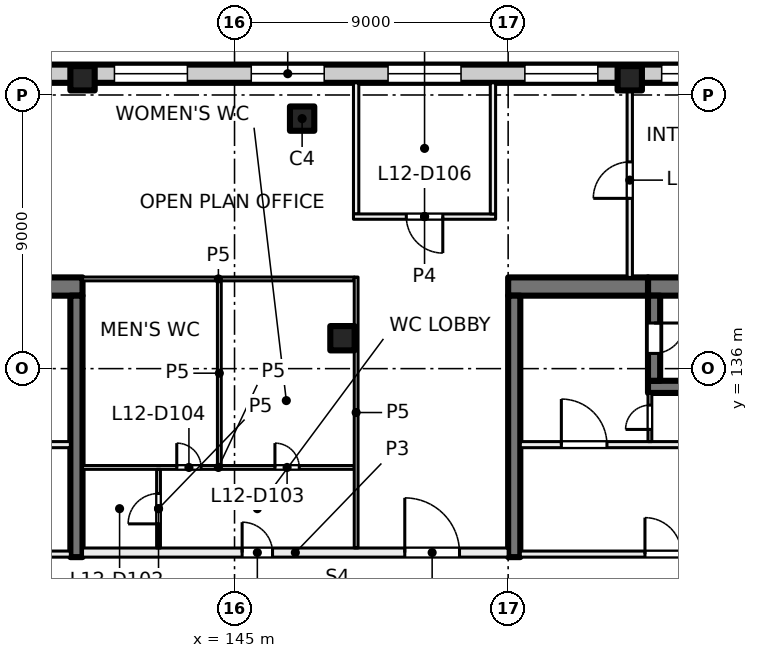
"""IFC4 building model, lengths in metres.
Left out: names, types, materials, properties, quantities, classifications, styles, units other than length and angle.
Written with IfcOpenShell. Run it as: python <this file> out.ifc"""

import sys

from ifc_helpers import new_model, si_unit, direction, frame, frame_2d, origin, origin_2d, place, context, subcontext, project, spatial, rectangle, extrude, element, fill, save


model = new_model("IFC4")
c1 = context("Model", 3, precision=1e-05, world=origin(), true_north=direction((0.0, 1.0)))
c2 = subcontext(c1, "Body", "Model", "MODEL_VIEW")
j1 = project(units=[si_unit("LENGTHUNIT", "METRE"), si_unit("PLANEANGLEUNIT", "RADIAN")], contexts=[c1])
p1 = place(None, origin())
s1 = spatial("IfcSite", under=j1, at=p1, CompositionType="ELEMENT")
p2 = place(p1, origin())
s2 = spatial("IfcBuilding", under=s1, at=p2, CompositionType="ELEMENT")
p3 = place(p2, frame((0.0, 0.0, 55.5)))
s3 = spatial("IfcBuildingStorey", under=s2, at=p3, CompositionType="ELEMENT", Elevation=55.5)
for number, where, z_axis, x_axis in (
    (1, (148.55, 137.0, 0.0), (0.0, 0.0, 1.0), (1.0, 0.0, 0.0)),
    (2, (140.0, 145.55, 0.0), (0.0, 0.0, 1.0), (1.0, 0.0, 0.0)),
    (3, (147.223, 144.223, 0.0), (0.0, 0.0, 1.0), (1.0, 0.0, 0.0)),
    (4, (158.0, 145.55, 0.0), (0.0, 0.0, 1.0), (1.0, 0.0, 0.0)),
):
    element("IfcColumn", number, at=place(p3, frame(where, z_axis=z_axis, x_axis=x_axis)), inside=s3, PredefinedType="COLUMN", context=c2, shape_type="SweptSolid", body=[
        extrude(rectangle(XDim=0.8, YDim=0.8, at=origin_2d()), origin(), (0.0, 0.0, 1.0), 4.0),
    ])
p4 = place(p3, frame((135.4, 138.7, 0.0), z_axis=(0.0, 0.0, 1.0), x_axis=(1.0, 0.0, 0.0)))
e5 = element("IfcWall", 5, at=p4, inside=s3, PredefinedType="SHEAR", context=c2, shape_type="SweptSolid", body=[
    extrude(rectangle(XDim=4.6, YDim=0.6, at=frame_2d((2.3, 0.0))), origin(), (0.0, 0.0, 1.0), 4.0),
])
p5 = place(p3, frame((139.8, 129.8, 0.0), z_axis=(0.0, 0.0, 1.0), x_axis=(0.0, 1.0, 0.0)))
e6 = element("IfcWall", 6, at=p5, inside=s3, PredefinedType="SHEAR", context=c2, shape_type="SweptSolid", body=[
    extrude(rectangle(XDim=8.6, YDim=0.4, at=frame_2d((4.3, 0.0))), origin(), (0.0, 0.0, 1.0), 4.0),
])
p6 = place(p3, frame((166.4, 138.7, 0.0), z_axis=(0.0, 0.0, 1.0), x_axis=(-1.0, 0.0, 0.0)))
e7 = element("IfcWall", 7, at=p6, inside=s3, PredefinedType="SHEAR", context=c2, shape_type="SweptSolid", body=[
    extrude(rectangle(XDim=7.8, YDim=0.6, at=frame_2d((3.9, 0.0))), origin(), (0.0, 0.0, 1.0), 4.0),
])
p7 = place(p3, frame((158.6, 138.7, 0.0), z_axis=(0.0, 0.0, 1.0), x_axis=(-1.0, 0.0, 0.0)))
e8 = element("IfcWall", 8, at=p7, inside=s3, PredefinedType="SHEAR", context=c2, shape_type="SweptSolid", body=[
    extrude(rectangle(XDim=4.6, YDim=0.6, at=frame_2d((2.3, 0.0))), origin(), (0.0, 0.0, 1.0), 4.0),
])
p8 = place(p3, frame((166.4, 135.4, 0.0), z_axis=(0.0, 0.0, 1.0), x_axis=(-1.0, 0.0, 0.0)))
e9 = element("IfcWall", 9, at=p8, inside=s3, PredefinedType="SHEAR", context=c2, shape_type="SweptSolid", body=[
    extrude(rectangle(XDim=7.8, YDim=0.4, at=frame_2d((3.9, 0.0))), origin(), (0.0, 0.0, 1.0), 4.0),
])
p9 = place(p3, frame((158.8, 138.4, 0.0), z_axis=(0.0, 0.0, 1.0), x_axis=(0.0, -1.0, 0.0)))
e10 = element("IfcWall", 10, at=p9, inside=s3, PredefinedType="SHEAR", context=c2, shape_type="SweptSolid", body=[
    extrude(rectangle(XDim=2.8, YDim=0.4, at=frame_2d((1.4, 0.0))), origin(), (0.0, 0.0, 1.0), 4.0),
])
p10 = place(p9, frame((0.9, 0.0, 0.0)))
e11 = element("IfcOpeningElement", 11, at=p10, cuts=e10, PredefinedType="OPENING", context=c2, shape_type="SweptSolid", body=[
    extrude(rectangle(XDim=1.0, YDim=2.1, at=frame_2d((0.5, 1.05))), frame((0.0, 0.21, 0.0), z_axis=(0.0, -1.0, 0.0), x_axis=(1.0, 0.0, 0.0)), (0.0, 0.0, 1.0), 0.42),
])
p11 = place(p3, frame((154.2, 138.4, 0.0), z_axis=(0.0, 0.0, 1.0), x_axis=(0.0, -1.0, 0.0)))
e12 = element("IfcWall", 12, at=p11, inside=s3, PredefinedType="SHEAR", context=c2, shape_type="SweptSolid", body=[
    extrude(rectangle(XDim=8.6, YDim=0.4, at=frame_2d((4.3, 0.0))), origin(), (0.0, 0.0, 1.0), 4.0),
])
p12 = place(p3, frame((131.07, 145.7, 0.0), z_axis=(0.0, 0.0, 1.0), x_axis=(1.0, 0.0, 0.0)))
e13 = element("IfcWall", 13, at=p12, inside=s3, PredefinedType="SOLIDWALL", context=c2, shape_type="SweptSolid", body=[
    extrude(rectangle(XDim=31.93, YDim=0.6, at=frame_2d((15.965, 0.0))), origin(), (0.0, 0.0, 1.0), 3.625),
])
p13 = place(p12, frame((0.98, 0.0, 0.9)))
e14 = element("IfcOpeningElement", 14, at=p13, cuts=e13, PredefinedType="OPENING", context=c2, shape_type="SweptSolid", body=[
    extrude(rectangle(XDim=2.4, YDim=2.4, at=frame_2d((1.2, 1.2))), frame((0.0, 0.31, 0.0), z_axis=(0.0, -1.0, 0.0), x_axis=(1.0, 0.0, 0.0)), (0.0, 0.0, 1.0), 0.62),
])
p14 = place(p12, frame((5.48, 0.0, 0.9)))
e15 = element("IfcOpeningElement", 15, at=p14, cuts=e13, PredefinedType="OPENING", context=c2, shape_type="SweptSolid", body=[
    extrude(rectangle(XDim=2.4, YDim=2.4, at=frame_2d((1.2, 1.2))), frame((0.0, 0.31, 0.0), z_axis=(0.0, -1.0, 0.0), x_axis=(1.0, 0.0, 0.0)), (0.0, 0.0, 1.0), 0.62),
])
p15 = place(p12, frame((9.98, 0.0, 0.9)))
e16 = element("IfcOpeningElement", 16, at=p15, cuts=e13, PredefinedType="OPENING", context=c2, shape_type="SweptSolid", body=[
    extrude(rectangle(XDim=2.4, YDim=2.4, at=frame_2d((1.2, 1.2))), frame((0.0, 0.31, 0.0), z_axis=(0.0, -1.0, 0.0), x_axis=(1.0, 0.0, 0.0)), (0.0, 0.0, 1.0), 0.62),
])
p16 = place(p12, frame((14.48, 0.0, 0.9)))
e17 = element("IfcOpeningElement", 17, at=p16, cuts=e13, PredefinedType="OPENING", context=c2, shape_type="SweptSolid", body=[
    extrude(rectangle(XDim=2.4, YDim=2.4, at=frame_2d((1.2, 1.2))), frame((0.0, 0.31, 0.0), z_axis=(0.0, -1.0, 0.0), x_axis=(1.0, 0.0, 0.0)), (0.0, 0.0, 1.0), 0.62),
])
p17 = place(p12, frame((18.98, 0.0, 0.9)))
e18 = element("IfcOpeningElement", 18, at=p17, cuts=e13, PredefinedType="OPENING", context=c2, shape_type="SweptSolid", body=[
    extrude(rectangle(XDim=2.4, YDim=2.4, at=frame_2d((1.2, 1.2))), frame((0.0, 0.31, 0.0), z_axis=(0.0, -1.0, 0.0), x_axis=(1.0, 0.0, 0.0)), (0.0, 0.0, 1.0), 0.62),
])
p18 = place(p12, frame((23.48, 0.0, 0.9)))
e19 = element("IfcOpeningElement", 19, at=p18, cuts=e13, PredefinedType="OPENING", context=c2, shape_type="SweptSolid", body=[
    extrude(rectangle(XDim=2.4, YDim=2.4, at=frame_2d((1.2, 1.2))), frame((0.0, 0.31, 0.0), z_axis=(0.0, -1.0, 0.0), x_axis=(1.0, 0.0, 0.0)), (0.0, 0.0, 1.0), 0.62),
])
p19 = place(p12, frame((27.98, 0.0, 0.9)))
e20 = element("IfcOpeningElement", 20, at=p19, cuts=e13, PredefinedType="OPENING", context=c2, shape_type="SweptSolid", body=[
    extrude(rectangle(XDim=2.4, YDim=2.4, at=frame_2d((1.2, 1.2))), frame((0.0, 0.31, 0.0), z_axis=(0.0, -1.0, 0.0), x_axis=(1.0, 0.0, 0.0)), (0.0, 0.0, 1.0), 0.62),
])
p20 = place(p3, frame((135.0, 129.9, 0.0), z_axis=(0.0, 0.0, 1.0), x_axis=(1.0, 0.0, 0.0)))
e21 = element("IfcWall", 21, at=p20, inside=s3, PredefinedType="PARTITIONING", context=c2, shape_type="SweptSolid", body=[
    extrude(rectangle(XDim=4.6, YDim=0.2, at=frame_2d((2.3, 0.0))), origin(), (0.0, 0.0, 1.0), 3.625),
])
p21 = place(p20, frame((1.7, 0.0, 0.0)))
e22 = element("IfcOpeningElement", 22, at=p21, cuts=e21, PredefinedType="OPENING", context=c2, shape_type="SweptSolid", body=[
    extrude(rectangle(XDim=1.2, YDim=2.1, at=frame_2d((0.6, 1.05))), frame((0.0, 0.11, 0.0), z_axis=(0.0, -1.0, 0.0), x_axis=(1.0, 0.0, 0.0)), (0.0, 0.0, 1.0), 0.22),
])
p22 = place(p3, frame((135.0, 133.5, 0.0), z_axis=(0.0, 0.0, 1.0), x_axis=(1.0, 0.0, 0.0)))
e23 = element("IfcWall", 23, at=p22, inside=s3, PredefinedType="PARTITIONING", context=c2, shape_type="SweptSolid", body=[
    extrude(rectangle(XDim=4.6, YDim=0.2, at=frame_2d((2.3, 0.0))), origin(), (0.0, 0.0, 1.0), 3.625),
])
p23 = place(p22, frame((1.75, 0.0, 0.0)))
e24 = element("IfcOpeningElement", 24, at=p23, cuts=e23, PredefinedType="OPENING", context=c2, shape_type="SweptSolid", body=[
    extrude(rectangle(XDim=1.5, YDim=2.1, at=frame_2d((0.75, 1.05))), frame((0.0, 0.11, 0.0), z_axis=(0.0, -1.0, 0.0), x_axis=(1.0, 0.0, 0.0)), (0.0, 0.0, 1.0), 0.22),
])
p24 = place(p3, frame((154.4, 129.9, 0.0), z_axis=(0.0, 0.0, 1.0), x_axis=(1.0, 0.0, 0.0)))
e25 = element("IfcWall", 25, at=p24, inside=s3, PredefinedType="PARTITIONING", context=c2, shape_type="SweptSolid", body=[
    extrude(rectangle(XDim=9.4, YDim=0.2, at=frame_2d((4.7, 0.0))), origin(), (0.0, 0.0, 1.0), 3.625),
])
p25 = place(p24, frame((4.1, 0.0, 0.0)))
e26 = element("IfcOpeningElement", 26, at=p25, cuts=e25, PredefinedType="OPENING", context=c2, shape_type="SweptSolid", body=[
    extrude(rectangle(XDim=1.2, YDim=2.1, at=frame_2d((0.6, 1.05))), frame((0.0, 0.11, 0.0), z_axis=(0.0, -1.0, 0.0), x_axis=(1.0, 0.0, 0.0)), (0.0, 0.0, 1.0), 0.22),
])
p26 = place(p3, frame((154.4, 133.5, 0.0), z_axis=(0.0, 0.0, 1.0), x_axis=(1.0, 0.0, 0.0)))
e27 = element("IfcWall", 27, at=p26, inside=s3, PredefinedType="PARTITIONING", context=c2, shape_type="SweptSolid", body=[
    extrude(rectangle(XDim=9.4, YDim=0.2, at=frame_2d((4.7, 0.0))), origin(), (0.0, 0.0, 1.0), 3.625),
])
p27 = place(p26, frame((1.35, 0.0, 0.0)))
e28 = element("IfcOpeningElement", 28, at=p27, cuts=e27, PredefinedType="OPENING", context=c2, shape_type="SweptSolid", body=[
    extrude(rectangle(XDim=1.5, YDim=2.1, at=frame_2d((0.75, 1.05))), frame((0.0, 0.11, 0.0), z_axis=(0.0, -1.0, 0.0), x_axis=(1.0, 0.0, 0.0)), (0.0, 0.0, 1.0), 0.22),
])
p28 = place(p3, frame((158.663, 133.6, 0.0), z_axis=(0.0, 0.0, 1.0), x_axis=(0.0, 1.0, 0.0)))
e29 = element("IfcWall", 29, at=p28, inside=s3, PredefinedType="PARTITIONING", context=c2, shape_type="SweptSolid", body=[
    extrude(rectangle(XDim=1.6, YDim=0.125, at=frame_2d((0.8, 0.0))), origin(), (0.0, 0.0, 1.0), 3.625),
])
p29 = place(p28, frame((0.4, 0.0, 0.0)))
e30 = element("IfcOpeningElement", 30, at=p29, cuts=e29, PredefinedType="OPENING", context=c2, shape_type="SweptSolid", body=[
    extrude(rectangle(XDim=0.8, YDim=2.1, at=frame_2d((0.4, 1.05))), frame((0.0, 0.073, 0.0), z_axis=(0.0, -1.0, 0.0), x_axis=(1.0, 0.0, 0.0)), (0.0, 0.0, 1.0), 0.145),
])
p30 = place(p3, frame((140.0, 129.95, 0.0), z_axis=(0.0, 0.0, 1.0), x_axis=(1.0, 0.0, 0.0)))
e31 = element("IfcWall", 31, at=p30, inside=s3, PredefinedType="PARTITIONING", context=c2, shape_type="SweptSolid", body=[
    extrude(rectangle(XDim=14.0, YDim=0.3, at=frame_2d((7.0, 0.0))), origin(), (0.0, 0.0, 1.0), 3.625),
])
p31 = place(p30, frame((5.25, 0.0, 0.0)))
e32 = element("IfcOpeningElement", 32, at=p31, cuts=e31, PredefinedType="OPENING", context=c2, shape_type="SweptSolid", body=[
    extrude(rectangle(XDim=1.0, YDim=2.1, at=frame_2d((0.5, 1.05))), frame((0.0, 0.16, 0.0), z_axis=(0.0, -1.0, 0.0), x_axis=(1.0, 0.0, 0.0)), (0.0, 0.0, 1.0), 0.32),
])
p32 = place(p30, frame((10.6, 0.0, 0.0)))
e33 = element("IfcOpeningElement", 33, at=p32, cuts=e31, PredefinedType="OPENING", context=c2, shape_type="SweptSolid", body=[
    extrude(rectangle(XDim=1.8, YDim=2.1, at=frame_2d((0.9, 1.05))), frame((0.0, 0.16, 0.0), z_axis=(0.0, -1.0, 0.0), x_axis=(1.0, 0.0, 0.0)), (0.0, 0.0, 1.0), 0.32),
])
p33 = place(p3, frame((140.0, 132.75, 0.0), z_axis=(0.0, 0.0, 1.0), x_axis=(1.0, 0.0, 0.0)))
e34 = element("IfcWall", 34, at=p33, inside=s3, PredefinedType="PARTITIONING", context=c2, shape_type="SweptSolid", body=[
    extrude(rectangle(XDim=8.938, YDim=0.125, at=frame_2d((4.469, 0.0))), origin(), (0.0, 0.0, 1.0), 3.625),
])
p34 = place(p33, frame((6.329, 0.0, 0.0)))
e35 = element("IfcOpeningElement", 35, at=p34, cuts=e34, PredefinedType="OPENING", context=c2, shape_type="SweptSolid", body=[
    extrude(rectangle(XDim=0.8, YDim=2.1, at=frame_2d((0.4, 1.05))), frame((0.0, 0.073, 0.0), z_axis=(0.0, -1.0, 0.0), x_axis=(1.0, 0.0, 0.0)), (0.0, 0.0, 1.0), 0.145),
])
p35 = place(p33, frame((3.1, 0.0, 0.0)))
e36 = element("IfcOpeningElement", 36, at=p35, cuts=e34, PredefinedType="OPENING", context=c2, shape_type="SweptSolid", body=[
    extrude(rectangle(XDim=0.8, YDim=2.1, at=frame_2d((0.4, 1.05))), frame((0.0, 0.073, 0.0), z_axis=(0.0, -1.0, 0.0), x_axis=(1.0, 0.0, 0.0)), (0.0, 0.0, 1.0), 0.145),
])
p36 = place(p3, frame((140.0, 138.95, 0.0), z_axis=(0.0, 0.0, 1.0), x_axis=(1.0, 0.0, 0.0)))
e37 = element("IfcWall", 37, at=p36, inside=s3, PredefinedType="PARTITIONING", context=c2, shape_type="SweptSolid", body=[
    extrude(rectangle(XDim=8.938, YDim=0.125, at=frame_2d((4.469, 0.0))), origin(), (0.0, 0.0, 1.0), 3.625),
])
p37 = place(p3, frame((142.5, 130.1, 0.0), z_axis=(0.0, 0.0, 1.0), x_axis=(0.0, 1.0, 0.0)))
e38 = element("IfcWall", 38, at=p37, inside=s3, PredefinedType="PARTITIONING", context=c2, shape_type="SweptSolid", body=[
    extrude(rectangle(XDim=2.588, YDim=0.125, at=frame_2d((1.294, 0.0))), origin(), (0.0, 0.0, 1.0), 3.625),
])
p38 = place(p37, frame((0.794, 0.0, 0.0)))
e39 = element("IfcOpeningElement", 39, at=p38, cuts=e38, PredefinedType="OPENING", context=c2, shape_type="SweptSolid", body=[
    extrude(rectangle(XDim=1.0, YDim=2.1, at=frame_2d((0.5, 1.05))), frame((0.0, 0.073, 0.0), z_axis=(0.0, -1.0, 0.0), x_axis=(1.0, 0.0, 0.0)), (0.0, 0.0, 1.0), 0.145),
])
p39 = place(p3, frame((144.5, 138.888, 0.0), z_axis=(0.0, 0.0, 1.0), x_axis=(0.0, -1.0, 0.0)))
e40 = element("IfcWall", 40, at=p39, inside=s3, PredefinedType="PARTITIONING", context=c2, shape_type="SweptSolid", body=[
    extrude(rectangle(XDim=6.076, YDim=0.125, at=frame_2d((3.038, 0.0))), origin(), (0.0, 0.0, 1.0), 3.625),
])
p40 = place(p3, frame((149.0, 139.012, 0.0), z_axis=(0.0, 0.0, 1.0), x_axis=(0.0, -1.0, 0.0)))
e41 = element("IfcWall", 41, at=p40, inside=s3, PredefinedType="PARTITIONING", context=c2, shape_type="SweptSolid", body=[
    extrude(rectangle(XDim=8.912, YDim=0.125, at=frame_2d((4.456, 0.0))), origin(), (0.0, 0.0, 1.0), 3.625),
])
p41 = place(p3, frame((149.0, 141.088, 0.0), z_axis=(0.0, 0.0, 1.0), x_axis=(0.0, 1.0, 0.0)))
e42 = element("IfcWall", 42, at=p41, inside=s3, PredefinedType="PARTITIONING", context=c2, shape_type="SweptSolid", body=[
    extrude(rectangle(XDim=4.312, YDim=0.175, at=frame_2d((2.156, 0.0))), origin(), (0.0, 0.0, 1.0), 3.625),
])
p42 = place(p3, frame((153.588, 141.0, 0.0), z_axis=(0.0, 0.0, 1.0), x_axis=(-1.0, 0.0, 0.0)))
e43 = element("IfcWall", 43, at=p42, inside=s3, PredefinedType="PARTITIONING", context=c2, shape_type="SweptSolid", body=[
    extrude(rectangle(XDim=4.676, YDim=0.175, at=frame_2d((2.338, 0.0))), origin(), (0.0, 0.0, 1.0), 3.625),
])
p43 = place(p42, frame((1.738, 0.0, 0.0)))
e44 = element("IfcOpeningElement", 44, at=p43, cuts=e43, PredefinedType="OPENING", context=c2, shape_type="SweptSolid", body=[
    extrude(rectangle(XDim=1.2, YDim=2.1, at=frame_2d((0.6, 1.05))), frame((0.0, 0.097, 0.0), z_axis=(0.0, -1.0, 0.0), x_axis=(1.0, 0.0, 0.0)), (0.0, 0.0, 1.0), 0.195),
])
p44 = place(p3, frame((153.5, 145.4, 0.0), z_axis=(0.0, 0.0, 1.0), x_axis=(0.0, -1.0, 0.0)))
e45 = element("IfcWall", 45, at=p44, inside=s3, PredefinedType="PARTITIONING", context=c2, shape_type="SweptSolid", body=[
    extrude(rectangle(XDim=4.312, YDim=0.175, at=frame_2d((2.156, 0.0))), origin(), (0.0, 0.0, 1.0), 3.625),
])
p45 = place(p3, frame((158.0, 139.0, 0.0), z_axis=(0.0, 0.0, 1.0), x_axis=(0.0, 1.0, 0.0)))
e46 = element("IfcWall", 46, at=p45, inside=s3, PredefinedType="PARTITIONING", context=c2, shape_type="SweptSolid", body=[
    extrude(rectangle(XDim=6.4, YDim=0.175, at=frame_2d((3.2, 0.0))), origin(), (0.0, 0.0, 1.0), 3.625),
])
p46 = place(p45, frame((2.6, 0.0, 0.0)))
e47 = element("IfcOpeningElement", 47, at=p46, cuts=e46, PredefinedType="OPENING", context=c2, shape_type="SweptSolid", body=[
    extrude(rectangle(XDim=1.2, YDim=2.1, at=frame_2d((0.6, 1.05))), frame((0.0, 0.097, 0.0), z_axis=(0.0, -1.0, 0.0), x_axis=(1.0, 0.0, 0.0)), (0.0, 0.0, 1.0), 0.195),
])
p47 = place(p15, origin())
e48 = element("IfcWindow", 48, at=p47, inside=s3, PartitioningType="SINGLE_PANEL", PredefinedType="WINDOW", context=c2, shape_type="SweptSolid", body=[
    extrude(rectangle(XDim=2.4, YDim=2.4, at=frame_2d((1.2, 1.2))), frame((0.0, 0.03, 0.0), z_axis=(0.0, -1.0, 0.0), x_axis=(1.0, 0.0, 0.0)), (0.0, 0.0, 1.0), 0.06),
])
fill(e16, e48)
p48 = place(p16, origin())
e49 = element("IfcWindow", 49, at=p48, inside=s3, PartitioningType="SINGLE_PANEL", PredefinedType="WINDOW", context=c2, shape_type="SweptSolid", body=[
    extrude(rectangle(XDim=2.4, YDim=2.4, at=frame_2d((1.2, 1.2))), frame((0.0, 0.03, 0.0), z_axis=(0.0, -1.0, 0.0), x_axis=(1.0, 0.0, 0.0)), (0.0, 0.0, 1.0), 0.06),
])
fill(e17, e49)
p49 = place(p17, origin())
e50 = element("IfcWindow", 50, at=p49, inside=s3, PartitioningType="SINGLE_PANEL", PredefinedType="WINDOW", context=c2, shape_type="SweptSolid", body=[
    extrude(rectangle(XDim=2.4, YDim=2.4, at=frame_2d((1.2, 1.2))), frame((0.0, 0.03, 0.0), z_axis=(0.0, -1.0, 0.0), x_axis=(1.0, 0.0, 0.0)), (0.0, 0.0, 1.0), 0.06),
])
fill(e18, e50)
p50 = place(p18, origin())
e51 = element("IfcWindow", 51, at=p50, inside=s3, PartitioningType="SINGLE_PANEL", PredefinedType="WINDOW", context=c2, shape_type="SweptSolid", body=[
    extrude(rectangle(XDim=2.4, YDim=2.4, at=frame_2d((1.2, 1.2))), frame((0.0, 0.03, 0.0), z_axis=(0.0, -1.0, 0.0), x_axis=(1.0, 0.0, 0.0)), (0.0, 0.0, 1.0), 0.06),
])
fill(e19, e51)
p51 = place(p19, origin())
e52 = element("IfcWindow", 52, at=p51, inside=s3, PartitioningType="SINGLE_PANEL", PredefinedType="WINDOW", context=c2, shape_type="SweptSolid", body=[
    extrude(rectangle(XDim=2.4, YDim=2.4, at=frame_2d((1.2, 1.2))), frame((0.0, 0.03, 0.0), z_axis=(0.0, -1.0, 0.0), x_axis=(1.0, 0.0, 0.0)), (0.0, 0.0, 1.0), 0.06),
])
fill(e20, e52)
p52 = place(p25, origin())
e53 = element("IfcDoor", 53, at=p52, inside=s3, OperationType="DOUBLE_DOOR_SINGLE_SWING", PredefinedType="DOOR", context=c2, shape_type="SweptSolid", body=[
    extrude(rectangle(XDim=1.2, YDim=2.1, at=frame_2d((0.6, 1.05))), frame((0.0, 0.025, 0.0), z_axis=(0.0, -1.0, 0.0), x_axis=(1.0, 0.0, 0.0)), (0.0, 0.0, 1.0), 0.05),
])
fill(e26, e53)
p53 = place(p27, origin())
e54 = element("IfcDoor", 54, at=p53, inside=s3, OperationType="DOUBLE_DOOR_SINGLE_SWING", PredefinedType="DOOR", context=c2, shape_type="SweptSolid", body=[
    extrude(rectangle(XDim=1.5, YDim=2.1, at=frame_2d((0.75, 1.05))), frame((0.0, 0.025, 0.0), z_axis=(0.0, -1.0, 0.0), x_axis=(1.0, 0.0, 0.0)), (0.0, 0.0, 1.0), 0.05),
])
fill(e28, e54)
p54 = place(p10, origin())
e55 = element("IfcDoor", 55, at=p54, inside=s3, OperationType="SINGLE_SWING_RIGHT", PredefinedType="DOOR", context=c2, shape_type="SweptSolid", body=[
    extrude(rectangle(XDim=1.0, YDim=2.1, at=frame_2d((0.5, 1.05))), frame((0.0, 0.025, 0.0), z_axis=(0.0, -1.0, 0.0), x_axis=(1.0, 0.0, 0.0)), (0.0, 0.0, 1.0), 0.05),
])
fill(e11, e55)
p55 = place(p29, origin())
e56 = element("IfcDoor", 56, at=p55, inside=s3, OperationType="SINGLE_SWING_LEFT", PredefinedType="DOOR", context=c2, shape_type="SweptSolid", body=[
    extrude(rectangle(XDim=0.8, YDim=2.1, at=frame_2d((0.4, 1.05))), frame((0.0, 0.025, 0.0), z_axis=(0.0, -1.0, 0.0), x_axis=(1.0, 0.0, 0.0)), (0.0, 0.0, 1.0), 0.05),
])
fill(e30, e56)
p56 = place(p31, origin())
e57 = element("IfcDoor", 57, at=p56, inside=s3, OperationType="SINGLE_SWING_RIGHT", PredefinedType="DOOR", context=c2, shape_type="SweptSolid", body=[
    extrude(rectangle(XDim=1.0, YDim=2.1, at=frame_2d((0.5, 1.05))), frame((0.0, 0.025, 0.0), z_axis=(0.0, -1.0, 0.0), x_axis=(1.0, 0.0, 0.0)), (0.0, 0.0, 1.0), 0.05),
])
fill(e32, e57)
p57 = place(p38, origin())
e58 = element("IfcDoor", 58, at=p57, inside=s3, OperationType="SINGLE_SWING_RIGHT", PredefinedType="DOOR", context=c2, shape_type="SweptSolid", body=[
    extrude(rectangle(XDim=1.0, YDim=2.1, at=frame_2d((0.5, 1.05))), frame((0.0, 0.025, 0.0), z_axis=(0.0, -1.0, 0.0), x_axis=(1.0, 0.0, 0.0)), (0.0, 0.0, 1.0), 0.05),
])
fill(e39, e58)
p58 = place(p34, origin())
e59 = element("IfcDoor", 59, at=p58, inside=s3, OperationType="SINGLE_SWING_RIGHT", PredefinedType="DOOR", context=c2, shape_type="SweptSolid", body=[
    extrude(rectangle(XDim=0.8, YDim=2.1, at=frame_2d((0.4, 1.05))), frame((0.0, 0.025, 0.0), z_axis=(0.0, -1.0, 0.0), x_axis=(1.0, 0.0, 0.0)), (0.0, 0.0, 1.0), 0.05),
])
fill(e35, e59)
p59 = place(p35, origin())
e60 = element("IfcDoor", 60, at=p59, inside=s3, OperationType="SINGLE_SWING_LEFT", PredefinedType="DOOR", context=c2, shape_type="SweptSolid", body=[
    extrude(rectangle(XDim=0.8, YDim=2.1, at=frame_2d((0.4, 1.05))), frame((0.0, 0.025, 0.0), z_axis=(0.0, -1.0, 0.0), x_axis=(1.0, 0.0, 0.0)), (0.0, 0.0, 1.0), 0.05),
])
fill(e36, e60)
p60 = place(p32, origin())
e61 = element("IfcDoor", 61, at=p60, inside=s3, OperationType="DOUBLE_DOOR_SINGLE_SWING", PredefinedType="DOOR", context=c2, shape_type="SweptSolid", body=[
    extrude(rectangle(XDim=1.8, YDim=2.1, at=frame_2d((0.9, 1.05))), frame((0.0, 0.025, 0.0), z_axis=(0.0, -1.0, 0.0), x_axis=(1.0, 0.0, 0.0)), (0.0, 0.0, 1.0), 0.05),
])
fill(e33, e61)
p61 = place(p43, origin())
e62 = element("IfcDoor", 62, at=p61, inside=s3, OperationType="DOUBLE_DOOR_SINGLE_SWING", PredefinedType="DOOR", context=c2, shape_type="SweptSolid", body=[
    extrude(rectangle(XDim=1.2, YDim=2.1, at=frame_2d((0.6, 1.05))), frame((0.0, 0.025, 0.0), z_axis=(0.0, -1.0, 0.0), x_axis=(1.0, 0.0, 0.0)), (0.0, 0.0, 1.0), 0.05),
])
fill(e44, e62)
p62 = place(p46, origin())
e63 = element("IfcDoor", 63, at=p62, inside=s3, OperationType="DOUBLE_DOOR_SINGLE_SWING", PredefinedType="DOOR", context=c2, shape_type="SweptSolid", body=[
    extrude(rectangle(XDim=1.2, YDim=2.1, at=frame_2d((0.6, 1.05))), frame((0.0, 0.025, 0.0), z_axis=(0.0, -1.0, 0.0), x_axis=(1.0, 0.0, 0.0)), (0.0, 0.0, 1.0), 0.05),
])
fill(e47, e63)
save(model, sys.argv[1])
